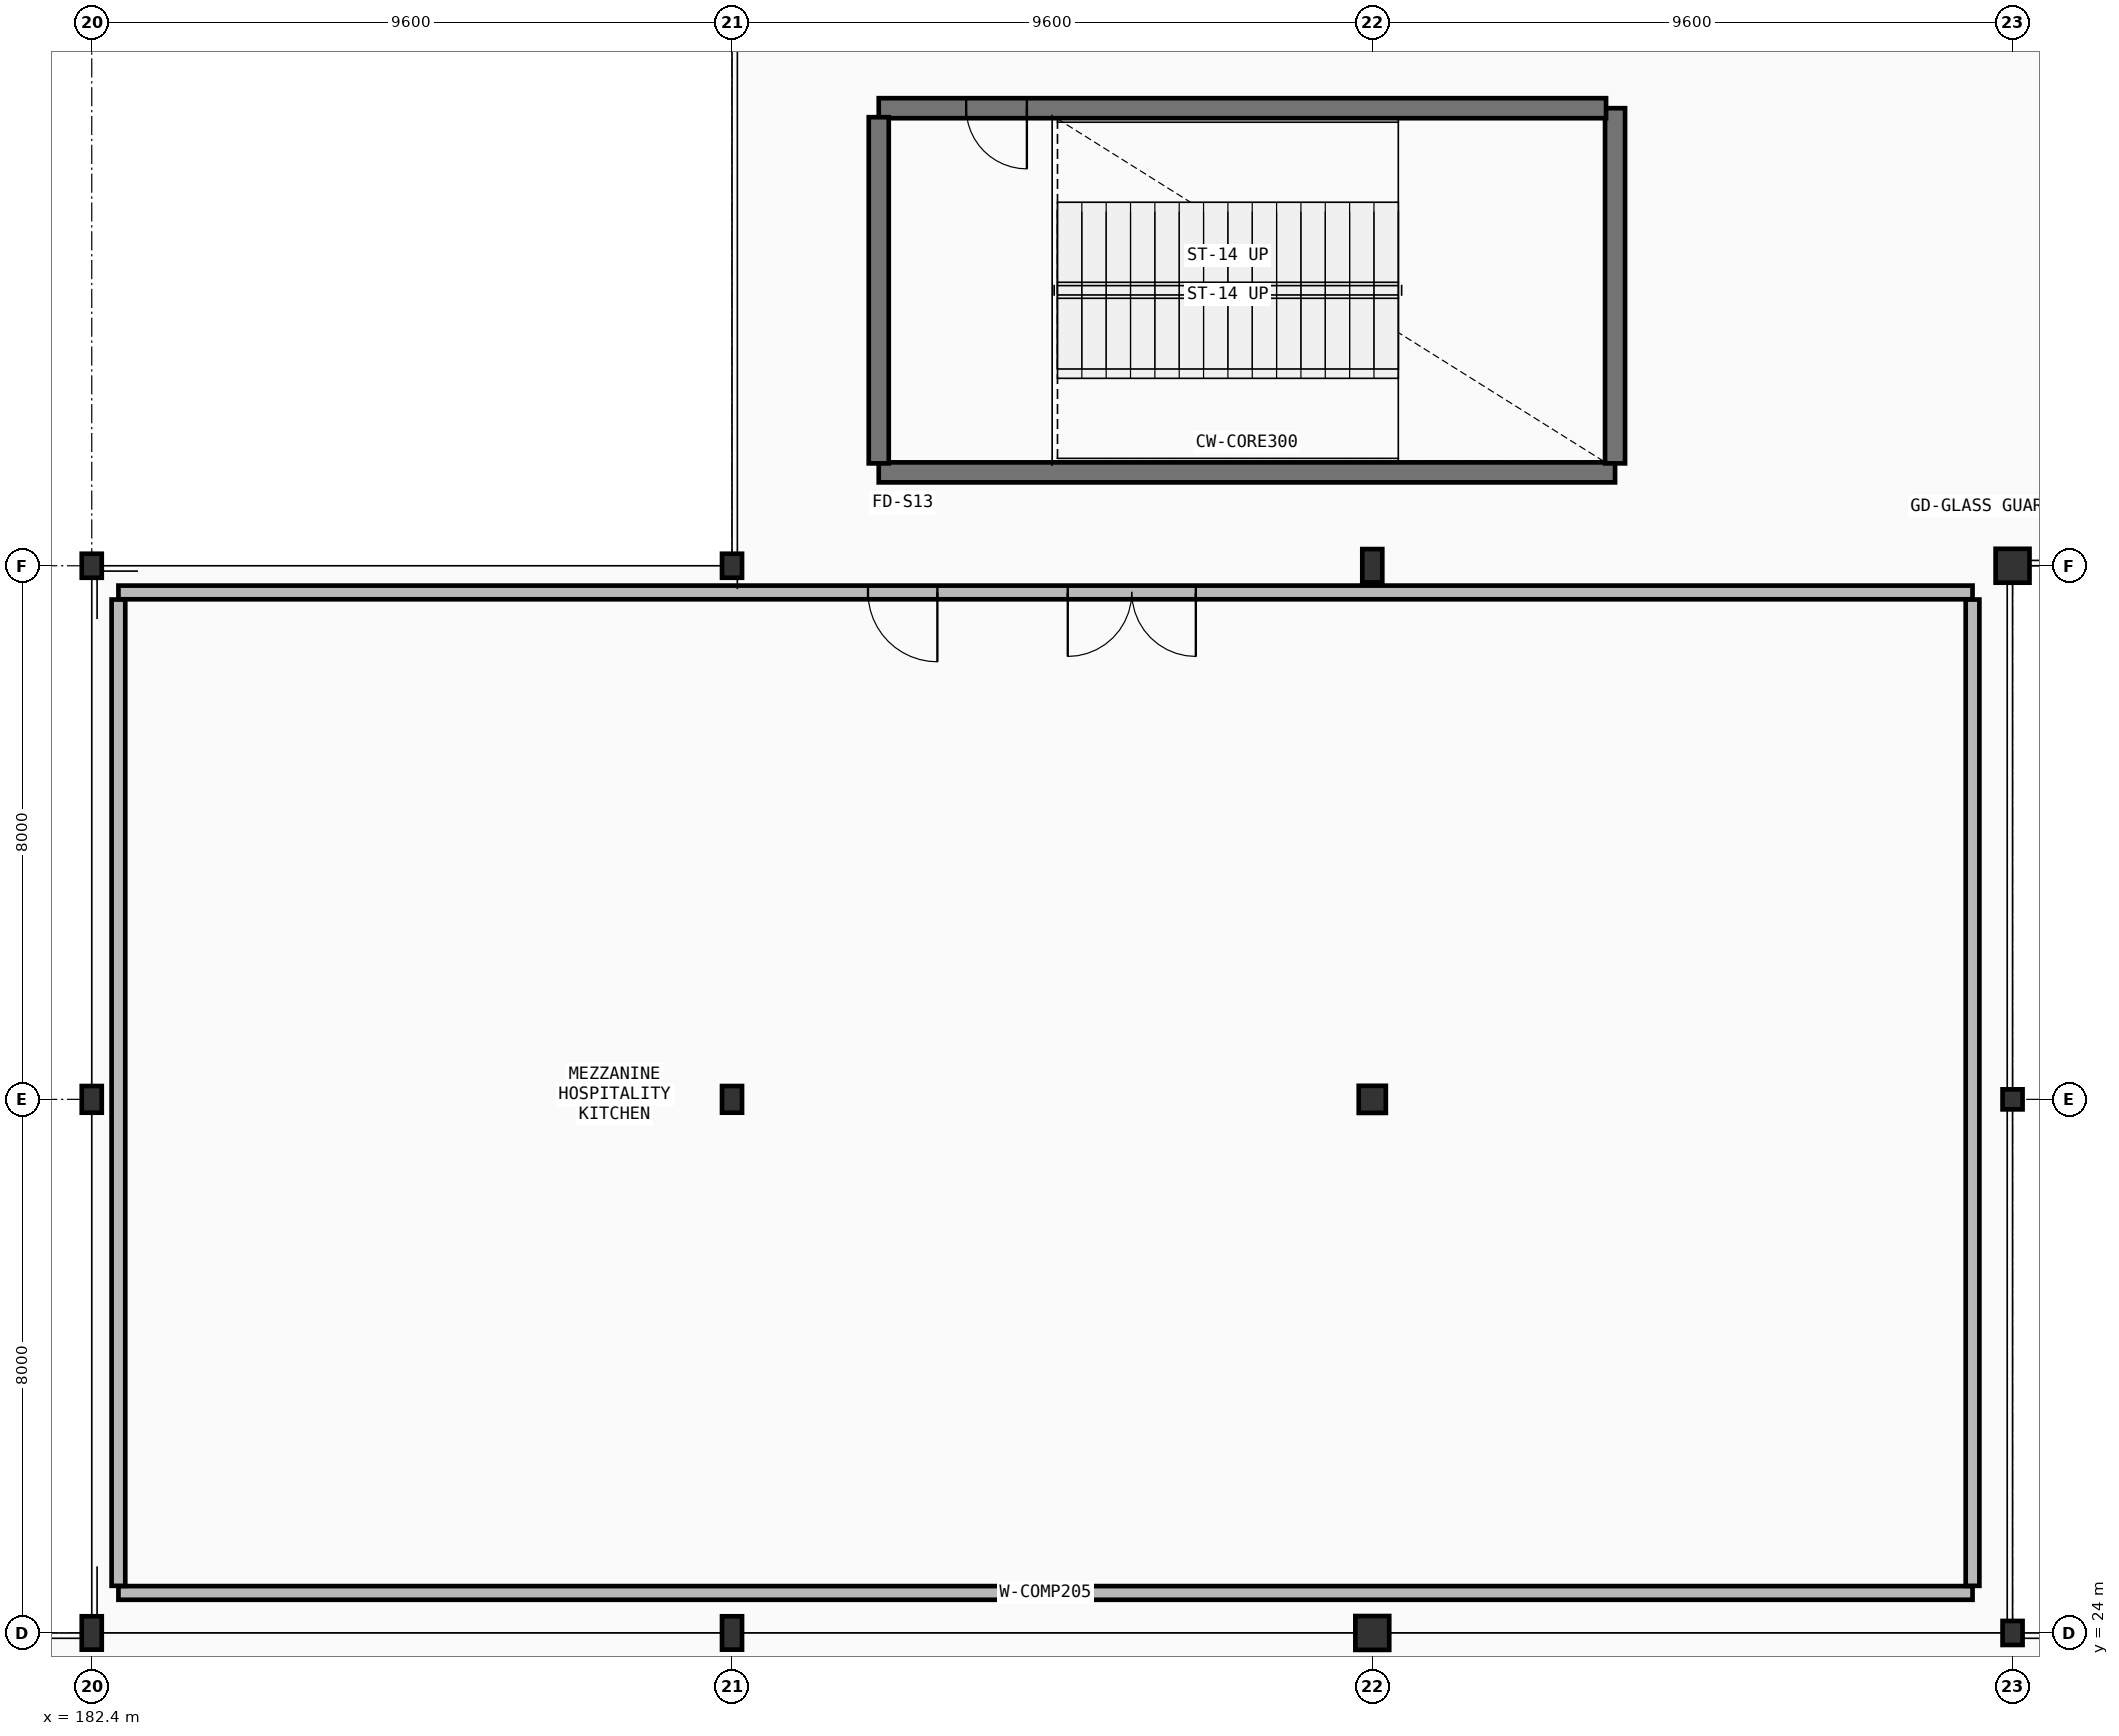
"""IFC4 building model, lengths in metres.
Left out: names, types, materials, properties, quantities, classifications, styles, units other than length and angle.
Written with IfcOpenShell. Run it as: python <this file> out.ifc"""

import sys

from ifc_helpers import new_model, si_unit, direction, frame, frame_2d, origin, origin_2d, place, context, subcontext, project, spatial, rectangle, hollow_circle, i_section, extrude, element, fill, save


model = new_model("IFC4")
c1 = context("Model", 3, precision=1e-05, world=origin(), true_north=direction((0.0, 1.0)))
c2 = subcontext(c1, "Body", "Model", "MODEL_VIEW")
j1 = project(units=[si_unit("LENGTHUNIT", "METRE"), si_unit("PLANEANGLEUNIT", "RADIAN")], contexts=[c1])
p1 = place(None, origin())
s1 = spatial("IfcSite", under=j1, at=p1, CompositionType="ELEMENT")
p2 = place(p1, origin())
s2 = spatial("IfcBuilding", under=s1, at=p2, CompositionType="ELEMENT")
p3 = place(p2, frame((0.0, 0.0, 6.0)))
s3 = spatial("IfcBuildingStorey", under=s2, at=p3, CompositionType="ELEMENT", Elevation=6.0)
p4 = place(p3, frame((182.4, 24.0, 0.0), z_axis=(0.0, 0.0, 1.0), x_axis=(1.0, 0.0, 0.0)))
e1 = element("IfcColumn", 1, at=p4, inside=s3, PredefinedType="COLUMN", context=c2, shape_type="SweptSolid", body=[
    extrude(i_section(OverallWidth=0.3, OverallDepth=0.5, WebThickness=0.014, FlangeThickness=0.028, FilletRadius=0.027, at=origin_2d()), origin(), (0.0, 0.0, 1.0), 5.4),
])
p5 = place(p3, frame((182.4, 32.0, 0.0), z_axis=(0.0, 0.0, 1.0), x_axis=(1.0, 0.0, 0.0)))
e2 = element("IfcColumn", 2, at=p5, inside=s3, PredefinedType="COLUMN", context=c2, shape_type="SweptSolid", body=[
    extrude(i_section(OverallWidth=0.3, OverallDepth=0.4, WebThickness=0.013, FlangeThickness=0.024, FilletRadius=0.027, at=origin_2d()), origin(), (0.0, 0.0, 1.0), 5.4),
])
p6 = place(p3, frame((182.4, 40.0, 0.0), z_axis=(0.0, 0.0, 1.0), x_axis=(1.0, 0.0, 0.0)))
e3 = element("IfcColumn", 3, at=p6, inside=s3, PredefinedType="COLUMN", context=c2, shape_type="SweptSolid", body=[
    extrude(i_section(OverallWidth=0.3, OverallDepth=0.36, WebThickness=0.012, FlangeThickness=0.022, FilletRadius=0.027, at=origin_2d()), origin(), (0.0, 0.0, 1.0), 5.4),
])
p7 = place(p3, frame((192.0, 24.0, 0.0), z_axis=(0.0, 0.0, 1.0), x_axis=(1.0, 0.0, 0.0)))
e4 = element("IfcColumn", 4, at=p7, inside=s3, PredefinedType="COLUMN", context=c2, shape_type="SweptSolid", body=[
    extrude(i_section(OverallWidth=0.3, OverallDepth=0.5, WebThickness=0.014, FlangeThickness=0.028, FilletRadius=0.027, at=origin_2d()), origin(), (0.0, 0.0, 1.0), 5.4),
])
p8 = place(p3, frame((192.0, 32.0, 0.0), z_axis=(0.0, 0.0, 1.0), x_axis=(1.0, 0.0, 0.0)))
e5 = element("IfcColumn", 5, at=p8, inside=s3, PredefinedType="COLUMN", context=c2, shape_type="SweptSolid", body=[
    extrude(i_section(OverallWidth=0.3, OverallDepth=0.4, WebThickness=0.013, FlangeThickness=0.024, FilletRadius=0.027, at=origin_2d()), origin(), (0.0, 0.0, 1.0), 5.4),
])
p9 = place(p3, frame((192.0, 40.0, 0.0), z_axis=(0.0, 0.0, 1.0), x_axis=(1.0, 0.0, 0.0)))
e6 = element("IfcColumn", 6, at=p9, inside=s3, PredefinedType="COLUMN", context=c2, shape_type="SweptSolid", body=[
    extrude(i_section(OverallWidth=0.3, OverallDepth=0.36, WebThickness=0.012, FlangeThickness=0.022, FilletRadius=0.027, at=origin_2d()), origin(), (0.0, 0.0, 1.0), 5.4),
])
p10 = place(p3, frame((201.6, 24.0, 0.0), z_axis=(0.0, 0.0, 1.0), x_axis=(1.0, 0.0, 0.0)))
e7 = element("IfcColumn", 7, at=p10, inside=s3, PredefinedType="COLUMN", context=c2, shape_type="SweptSolid", body=[
    extrude(hollow_circle(Radius=0.254, WallThickness=0.025, at=origin_2d()), origin(), (0.0, 0.0, 1.0), 5.4),
])
p11 = place(p3, frame((201.6, 32.0, 0.0), z_axis=(0.0, 0.0, 1.0), x_axis=(1.0, 0.0, 0.0)))
e8 = element("IfcColumn", 8, at=p11, inside=s3, PredefinedType="COLUMN", context=c2, shape_type="SweptSolid", body=[
    extrude(hollow_circle(Radius=0.203, WallThickness=0.02, at=origin_2d()), origin(), (0.0, 0.0, 1.0), 5.4),
])
p12 = place(p3, frame((201.6, 40.0, 0.0), z_axis=(0.0, 0.0, 1.0), x_axis=(1.0, 0.0, 0.0)))
e9 = element("IfcColumn", 9, at=p12, inside=s3, PredefinedType="COLUMN", context=c2, shape_type="SweptSolid", body=[
    extrude(i_section(OverallWidth=0.3, OverallDepth=0.5, WebThickness=0.014, FlangeThickness=0.028, FilletRadius=0.027, at=origin_2d()), origin(), (0.0, 0.0, 1.0), 5.4),
])
p13 = place(p3, frame((211.2, 24.0, 0.0), z_axis=(0.0, 0.0, 1.0), x_axis=(1.0, 0.0, 0.0)))
e10 = element("IfcColumn", 10, at=p13, inside=s3, PredefinedType="COLUMN", context=c2, shape_type="SweptSolid", body=[
    extrude(i_section(OverallWidth=0.3, OverallDepth=0.36, WebThickness=0.012, FlangeThickness=0.022, FilletRadius=0.027, at=origin_2d()), origin(), (0.0, 0.0, 1.0), 5.4),
])
p14 = place(p3, frame((211.2, 32.0, 0.0), z_axis=(0.0, 0.0, 1.0), x_axis=(1.0, 0.0, 0.0)))
e11 = element("IfcColumn", 11, at=p14, inside=s3, PredefinedType="COLUMN", context=c2, shape_type="SweptSolid", body=[
    extrude(i_section(OverallWidth=0.3, OverallDepth=0.3, WebThickness=0.011, FlangeThickness=0.019, FilletRadius=0.027, at=origin_2d()), origin(), (0.0, 0.0, 1.0), 5.4),
])
p15 = place(p3, frame((211.2, 40.0, 0.0), z_axis=(0.0, 0.0, 1.0), x_axis=(1.0, 0.0, 0.0)))
e12 = element("IfcColumn", 12, at=p15, inside=s3, PredefinedType="COLUMN", context=c2, shape_type="SweptSolid", body=[
    extrude(hollow_circle(Radius=0.254, WallThickness=0.025, at=origin_2d()), origin(), (0.0, 0.0, 1.0), 5.4),
])
p16 = place(p3, frame((194.2, 41.4, 0.0), z_axis=(0.0, 0.0, 1.0), x_axis=(1.0, 0.0, 0.0)))
e13 = element("IfcWall", 13, at=p16, inside=s3, PredefinedType="SHEAR", context=c2, shape_type="SweptSolid", body=[
    extrude(rectangle(XDim=11.04, YDim=0.3, at=frame_2d((5.52, 0.0))), origin(), (0.0, 0.0, 1.0), 5.17),
])
p17 = place(p3, frame((205.24, 41.535, 0.0), z_axis=(0.0, 0.0, 1.0), x_axis=(0.0, 1.0, 0.0)))
e14 = element("IfcWall", 14, at=p17, inside=s3, PredefinedType="SHEAR", context=c2, shape_type="SweptSolid", body=[
    extrude(rectangle(XDim=5.325, YDim=0.3, at=frame_2d((2.663, 0.0))), origin(), (0.0, 0.0, 1.0), 5.17),
])
p18 = place(p3, frame((205.105, 46.86, 0.0), z_axis=(0.0, 0.0, 1.0), x_axis=(-1.0, 0.0, 0.0)))
e15 = element("IfcWall", 15, at=p18, inside=s3, PredefinedType="SHEAR", context=c2, shape_type="SweptSolid", body=[
    extrude(rectangle(XDim=10.905, YDim=0.3, at=frame_2d((5.453, 0.0))), origin(), (0.0, 0.0, 1.0), 5.17),
])
p19 = place(p18, frame((8.684, 0.0, 0.0)))
e16 = element("IfcOpeningElement", 16, at=p19, cuts=e15, PredefinedType="OPENING", context=c2, shape_type="SweptSolid", body=[
    extrude(rectangle(XDim=0.91, YDim=2.08, at=frame_2d((0.455, 1.04))), frame((0.0, 0.16, 0.0), z_axis=(0.0, -1.0, 0.0), x_axis=(1.0, 0.0, 0.0)), (0.0, 0.0, 1.0), 0.32),
])
p20 = place(p3, frame((194.2, 46.725, 0.0), z_axis=(0.0, 0.0, 1.0), x_axis=(0.0, -1.0, 0.0)))
e17 = element("IfcWall", 17, at=p20, inside=s3, PredefinedType="SHEAR", context=c2, shape_type="SweptSolid", body=[
    extrude(rectangle(XDim=5.19, YDim=0.3, at=frame_2d((2.595, 0.0))), origin(), (0.0, 0.0, 1.0), 5.17),
])
p21 = place(p3, frame((210.6, 39.6, 0.0), z_axis=(0.0, 0.0, 1.0), x_axis=(-1.0, 0.0, 0.0)))
e18 = element("IfcWall", 18, at=p21, inside=s3, PredefinedType="SOLIDWALL", context=c2, shape_type="SweptSolid", body=[
    extrude(rectangle(XDim=27.8, YDim=0.205, at=frame_2d((13.9, 0.0))), origin(), (0.0, 0.0, 1.0), 4.54),
])
p22 = place(p21, frame((11.646, 0.0, 0.0)))
e19 = element("IfcOpeningElement", 19, at=p22, cuts=e18, PredefinedType="OPENING", context=c2, shape_type="SweptSolid", body=[
    extrude(rectangle(XDim=1.92, YDim=2.3, at=frame_2d((0.96, 1.15))), frame((0.0, 0.113, 0.0), z_axis=(0.0, -1.0, 0.0), x_axis=(1.0, 0.0, 0.0)), (0.0, 0.0, 1.0), 0.225),
])
p23 = place(p21, frame((15.521, 0.0, 0.0)))
e20 = element("IfcOpeningElement", 20, at=p23, cuts=e18, PredefinedType="OPENING", context=c2, shape_type="SweptSolid", body=[
    extrude(rectangle(XDim=1.04, YDim=2.24, at=frame_2d((0.52, 1.12))), frame((0.0, 0.113, 0.0), z_axis=(0.0, -1.0, 0.0), x_axis=(1.0, 0.0, 0.0)), (0.0, 0.0, 1.0), 0.225),
])
p24 = place(p3, frame((182.8, 24.6, 0.0), z_axis=(0.0, 0.0, 1.0), x_axis=(1.0, 0.0, 0.0)))
e21 = element("IfcWall", 21, at=p24, inside=s3, PredefinedType="SOLIDWALL", context=c2, shape_type="SweptSolid", body=[
    extrude(rectangle(XDim=27.8, YDim=0.205, at=frame_2d((13.9, 0.0))), origin(), (0.0, 0.0, 1.0), 4.54),
])
p25 = place(p3, frame((210.6, 24.707, 0.0), z_axis=(0.0, 0.0, 1.0), x_axis=(0.0, 1.0, 0.0)))
e22 = element("IfcWall", 22, at=p25, inside=s3, PredefinedType="SOLIDWALL", context=c2, shape_type="SweptSolid", body=[
    extrude(rectangle(XDim=14.787, YDim=0.205, at=frame_2d((7.394, 0.0))), origin(), (0.0, 0.0, 1.0), 4.64),
])
p26 = place(p3, frame((182.8, 39.493, 0.0), z_axis=(0.0, 0.0, 1.0), x_axis=(0.0, -1.0, 0.0)))
e23 = element("IfcWall", 23, at=p26, inside=s3, PredefinedType="SOLIDWALL", context=c2, shape_type="SweptSolid", body=[
    extrude(rectangle(XDim=14.787, YDim=0.205, at=frame_2d((7.394, 0.0))), origin(), (0.0, 0.0, 1.0), 4.54),
])
p27 = place(p19, origin())
e24 = element("IfcDoor", 24, at=p27, inside=s3, OperationType="SINGLE_SWING_RIGHT", PredefinedType="DOOR", context=c2, shape_type="SweptSolid", body=[
    extrude(rectangle(XDim=0.91, YDim=2.08, at=frame_2d((0.455, 1.04))), frame((0.0, 0.025, 0.0), z_axis=(0.0, -1.0, 0.0), x_axis=(1.0, 0.0, 0.0)), (0.0, 0.0, 1.0), 0.05),
])
fill(e16, e24)
p28 = place(p22, origin())
e25 = element("IfcDoor", 25, at=p28, inside=s3, OperationType="DOUBLE_DOOR_SINGLE_SWING", PredefinedType="DOOR", context=c2, shape_type="SweptSolid", body=[
    extrude(rectangle(XDim=1.92, YDim=2.3, at=frame_2d((0.96, 1.15))), frame((0.0, 0.025, 0.0), z_axis=(0.0, -1.0, 0.0), x_axis=(1.0, 0.0, 0.0)), (0.0, 0.0, 1.0), 0.05),
])
fill(e19, e25)
p29 = place(p23, origin())
e26 = element("IfcDoor", 26, at=p29, inside=s3, OperationType="SINGLE_SWING_RIGHT", PredefinedType="DOOR", context=c2, shape_type="SweptSolid", body=[
    extrude(rectangle(XDim=1.04, YDim=2.24, at=frame_2d((0.52, 1.12))), frame((0.0, 0.025, 0.0), z_axis=(0.0, -1.0, 0.0), x_axis=(1.0, 0.0, 0.0)), (0.0, 0.0, 1.0), 0.05),
])
fill(e20, e26)
save(model, sys.argv[1])
